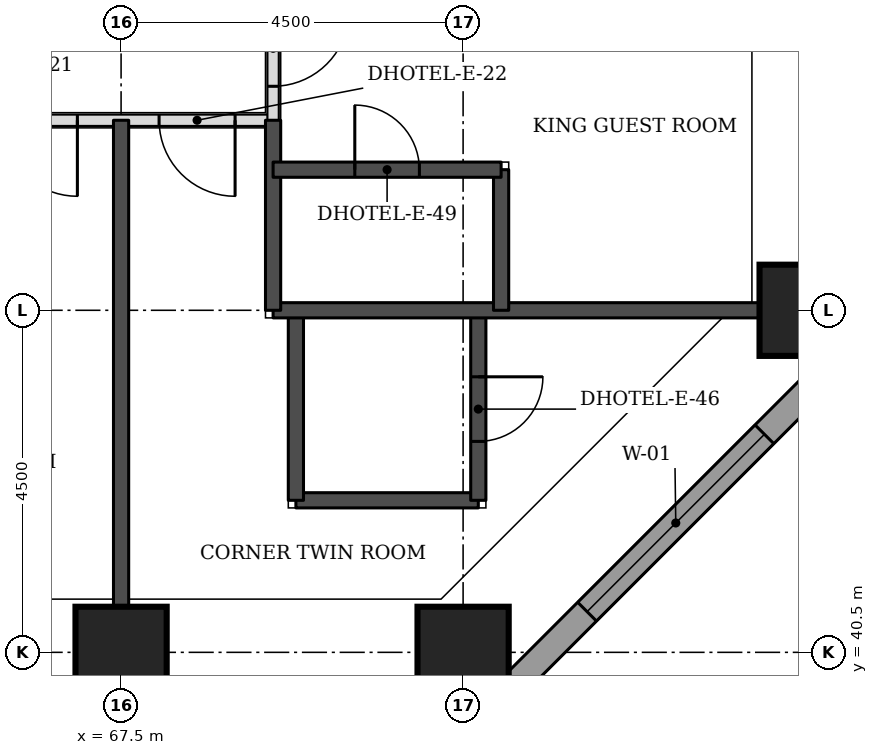
"""IFC4 building model, lengths in metres.
Left out: names, types, materials, properties, quantities, classifications, styles, units other than length and angle.
Written with IfcOpenShell. Run it as: python <this file> out.ifc"""

import sys

from ifc_helpers import new_model, si_unit, direction, frame, frame_2d, origin, origin_2d, place, context, subcontext, project, spatial, rectangle, extrude, element, fill, save


model = new_model("IFC4")
c1 = context("Model", 3, precision=1e-05, world=origin(), true_north=direction((0.0, 1.0)))
c2 = subcontext(c1, "Body", "Model", "MODEL_VIEW")
j1 = project(units=[si_unit("LENGTHUNIT", "METRE"), si_unit("PLANEANGLEUNIT", "RADIAN")], contexts=[c1])
p1 = place(None, origin())
s1 = spatial("IfcSite", under=j1, at=p1, CompositionType="ELEMENT")
p2 = place(p1, origin())
s2 = spatial("IfcBuilding", under=s1, at=p2, CompositionType="ELEMENT")
p3 = place(p2, frame((0.0, 0.0, 39.6)))
s3 = spatial("IfcBuildingStorey", under=s2, at=p3, CompositionType="ELEMENT", Elevation=39.6)
for number, where, z_axis, x_axis in (
    (1, (67.5, 40.5, 0.0), (0.0, 0.0, 1.0), (1.0, 0.0, 0.0)),
    (2, (72.0, 40.5, 0.0), (0.0, 0.0, 1.0), (1.0, 0.0, 0.0)),
    (3, (76.5, 45.0, 0.0), (0.0, 0.0, 1.0), (1.0, 0.0, 0.0)),
):
    element("IfcColumn", number, at=place(p3, frame(where, z_axis=z_axis, x_axis=x_axis)), inside=s3, PredefinedType="COLUMN", context=c2, shape_type="SweptSolid", body=[
        extrude(rectangle(XDim=1.2, YDim=1.2, at=origin_2d()), origin(), (0.0, 0.0, 1.0), 3.3),
    ])
p4 = place(p3, frame((72.27, 39.674, 0.0), z_axis=(0.0, 0.0, 1.0), x_axis=(0.707106781187, 0.707106781187, 0.0)))
e4 = element("IfcWall", 4, at=p4, inside=s3, PredefinedType="STANDARD", context=c2, shape_type="SweptSolid", body=[
    extrude(rectangle(XDim=7.151, YDim=0.35, at=frame_2d((3.576, 0.0))), origin(), (0.0, 0.0, 1.0), 3.055),
])
p5 = place(p4, frame((1.926, 0.0, 0.8)))
e5 = element("IfcOpeningElement", 5, at=p5, cuts=e4, PredefinedType="OPENING", context=c2, shape_type="SweptSolid", body=[
    extrude(rectangle(XDim=3.3, YDim=1.5, at=frame_2d((1.65, 0.75))), frame((0.0, 0.185, 0.0), z_axis=(0.0, -1.0, 0.0), x_axis=(1.0, 0.0, 0.0)), (0.0, 0.0, 1.0), 0.37),
])
p6 = place(p3, frame((52.85, 47.5, 0.0), z_axis=(0.0, 0.0, 1.0), x_axis=(1.0, 0.0, 0.0)))
e6 = element("IfcWall", 6, at=p6, inside=s3, PredefinedType="PARTITIONING", context=c2, shape_type="SweptSolid", body=[
    extrude(rectangle(XDim=16.65, YDim=0.15, at=frame_2d((8.325, 0.0))), origin(), (0.0, 0.0, 1.0), 3.08),
])
p7 = place(p6, frame((13.075, 0.0, 0.0)))
e7 = element("IfcOpeningElement", 7, at=p7, cuts=e6, PredefinedType="OPENING", context=c2, shape_type="SweptSolid", body=[
    extrude(rectangle(XDim=1.0, YDim=2.1, at=frame_2d((0.5, 1.05))), frame((0.0, 0.085, 0.0), z_axis=(0.0, -1.0, 0.0), x_axis=(1.0, 0.0, 0.0)), (0.0, 0.0, 1.0), 0.17),
])
p8 = place(p6, frame((6.475, 0.0, 0.0)))
e8 = element("IfcOpeningElement", 8, at=p8, cuts=e6, PredefinedType="OPENING", context=c2, shape_type="SweptSolid", body=[
    extrude(rectangle(XDim=1.0, YDim=2.1, at=frame_2d((0.5, 1.05))), frame((0.0, 0.085, 0.0), z_axis=(0.0, -1.0, 0.0), x_axis=(1.0, 0.0, 0.0)), (0.0, 0.0, 1.0), 0.17),
])
p9 = place(p6, frame((15.15, 0.0, 0.0)))
e9 = element("IfcOpeningElement", 9, at=p9, cuts=e6, PredefinedType="OPENING", context=c2, shape_type="SweptSolid", body=[
    extrude(rectangle(XDim=1.0, YDim=2.1, at=frame_2d((0.5, 1.05))), frame((0.0, 0.085, 0.0), z_axis=(0.0, -1.0, 0.0), x_axis=(1.0, 0.0, 0.0)), (0.0, 0.0, 1.0), 0.17),
])
p10 = place(p3, frame((69.5, 47.5, 0.0), z_axis=(0.0, 0.0, 1.0), x_axis=(0.0, 1.0, 0.0)))
e10 = element("IfcWall", 10, at=p10, inside=s3, PredefinedType="PARTITIONING", context=c2, shape_type="SweptSolid", body=[
    extrude(rectangle(XDim=26.5, YDim=0.15, at=frame_2d((13.25, 0.0))), origin(), (0.0, 0.0, 1.0), 3.08),
])
p11 = place(p10, frame((25.053, 0.0, 0.0)))
e11 = element("IfcOpeningElement", 11, at=p11, cuts=e10, PredefinedType="OPENING", context=c2, shape_type="SweptSolid", body=[
    extrude(rectangle(XDim=1.0, YDim=2.1, at=frame_2d((0.5, 1.05))), frame((0.0, 0.085, 0.0), z_axis=(0.0, -1.0, 0.0), x_axis=(1.0, 0.0, 0.0)), (0.0, 0.0, 1.0), 0.17),
])
p12 = place(p10, frame((13.775, 0.0, 0.0)))
e12 = element("IfcOpeningElement", 12, at=p12, cuts=e10, PredefinedType="OPENING", context=c2, shape_type="SweptSolid", body=[
    extrude(rectangle(XDim=1.0, YDim=2.1, at=frame_2d((0.5, 1.05))), frame((0.0, 0.085, 0.0), z_axis=(0.0, -1.0, 0.0), x_axis=(1.0, 0.0, 0.0)), (0.0, 0.0, 1.0), 0.17),
])
p13 = place(p10, frame((7.65, 0.0, 0.0)))
e13 = element("IfcOpeningElement", 13, at=p13, cuts=e10, PredefinedType="OPENING", context=c2, shape_type="SweptSolid", body=[
    extrude(rectangle(XDim=1.1, YDim=2.1, at=frame_2d((0.55, 1.05))), frame((0.0, 0.085, 0.0), z_axis=(0.0, -1.0, 0.0), x_axis=(1.0, 0.0, 0.0)), (0.0, 0.0, 1.0), 0.17),
])
p14 = place(p10, frame((0.447, 0.0, 0.0)))
e14 = element("IfcOpeningElement", 14, at=p14, cuts=e10, PredefinedType="OPENING", context=c2, shape_type="SweptSolid", body=[
    extrude(rectangle(XDim=1.0, YDim=2.1, at=frame_2d((0.5, 1.05))), frame((0.0, 0.085, 0.0), z_axis=(0.0, -1.0, 0.0), x_axis=(1.0, 0.0, 0.0)), (0.0, 0.0, 1.0), 0.17),
])
p15 = place(p3, frame((67.5, 41.1, 0.0), z_axis=(0.0, 0.0, 1.0), x_axis=(0.0, 1.0, 0.0)))
e15 = element("IfcWall", 15, at=p15, inside=s3, PredefinedType="SOLIDWALL", context=c2, shape_type="SweptSolid", body=[
    extrude(rectangle(XDim=6.4, YDim=0.2, at=frame_2d((3.2, 0.0))), origin(), (0.0, 0.0, 1.0), 3.08),
])
p16 = place(p3, frame((69.8, 42.5, 0.0), z_axis=(0.0, 0.0, 1.0), x_axis=(1.0, 0.0, 0.0)))
e16 = element("IfcWall", 16, at=p16, inside=s3, PredefinedType="SOLIDWALL", context=c2, shape_type="SweptSolid", body=[
    extrude(rectangle(XDim=2.4, YDim=0.2, at=frame_2d((1.2, 0.0))), origin(), (0.0, 0.0, 1.0), 3.08),
])
p17 = place(p3, frame((69.8, 42.5, 0.0), z_axis=(0.0, 0.0, 1.0), x_axis=(0.0, 1.0, 0.0)))
e17 = element("IfcWall", 17, at=p17, inside=s3, PredefinedType="SOLIDWALL", context=c2, shape_type="SweptSolid", body=[
    extrude(rectangle(XDim=2.5, YDim=0.2, at=frame_2d((1.25, 0.0))), origin(), (0.0, 0.0, 1.0), 3.08),
])
p18 = place(p3, frame((72.2, 42.5, 0.0), z_axis=(0.0, 0.0, 1.0), x_axis=(0.0, 1.0, 0.0)))
e18 = element("IfcWall", 18, at=p18, inside=s3, PredefinedType="SOLIDWALL", context=c2, shape_type="SweptSolid", body=[
    extrude(rectangle(XDim=2.5, YDim=0.2, at=frame_2d((1.25, 0.0))), origin(), (0.0, 0.0, 1.0), 3.08),
])
p19 = place(p18, frame((0.775, 0.0, 0.0)))
e19 = element("IfcOpeningElement", 19, at=p19, cuts=e18, PredefinedType="OPENING", context=c2, shape_type="SweptSolid", body=[
    extrude(rectangle(XDim=0.85, YDim=2.1, at=frame_2d((0.425, 1.05))), frame((0.0, 0.11, 0.0), z_axis=(0.0, -1.0, 0.0), x_axis=(1.0, 0.0, 0.0)), (0.0, 0.0, 1.0), 0.22),
])
p20 = place(p3, frame((69.5, 45.0, 0.0), z_axis=(0.0, 0.0, 1.0), x_axis=(1.0, 0.0, 0.0)))
e20 = element("IfcWall", 20, at=p20, inside=s3, PredefinedType="SOLIDWALL", context=c2, shape_type="SweptSolid", body=[
    extrude(rectangle(XDim=6.4, YDim=0.2, at=frame_2d((3.2, 0.0))), origin(), (0.0, 0.0, 1.0), 3.08),
])
p21 = place(p3, frame((69.5, 45.0, 0.0), z_axis=(0.0, 0.0, 1.0), x_axis=(0.0, 1.0, 0.0)))
e21 = element("IfcWall", 21, at=p21, inside=s3, PredefinedType="SOLIDWALL", context=c2, shape_type="SweptSolid", body=[
    extrude(rectangle(XDim=2.5, YDim=0.2, at=frame_2d((1.25, 0.0))), origin(), (0.0, 0.0, 1.0), 3.08),
])
p22 = place(p3, frame((72.5, 45.0, 0.0), z_axis=(0.0, 0.0, 1.0), x_axis=(0.0, 1.0, 0.0)))
e22 = element("IfcWall", 22, at=p22, inside=s3, PredefinedType="SOLIDWALL", context=c2, shape_type="SweptSolid", body=[
    extrude(rectangle(XDim=1.85, YDim=0.2, at=frame_2d((0.925, 0.0))), origin(), (0.0, 0.0, 1.0), 3.08),
])
p23 = place(p3, frame((69.5, 46.85, 0.0), z_axis=(0.0, 0.0, 1.0), x_axis=(1.0, 0.0, 0.0)))
e23 = element("IfcWall", 23, at=p23, inside=s3, PredefinedType="SOLIDWALL", context=c2, shape_type="SweptSolid", body=[
    extrude(rectangle(XDim=3.0, YDim=0.2, at=frame_2d((1.5, 0.0))), origin(), (0.0, 0.0, 1.0), 3.08),
])
p24 = place(p23, frame((1.075, 0.0, 0.0)))
e24 = element("IfcOpeningElement", 24, at=p24, cuts=e23, PredefinedType="OPENING", context=c2, shape_type="SweptSolid", body=[
    extrude(rectangle(XDim=0.85, YDim=2.1, at=frame_2d((0.425, 1.05))), frame((0.0, 0.11, 0.0), z_axis=(0.0, -1.0, 0.0), x_axis=(1.0, 0.0, 0.0)), (0.0, 0.0, 1.0), 0.22),
])
p25 = place(p5, origin())
e25 = element("IfcWindow", 25, at=p25, inside=s3, PartitioningType="SINGLE_PANEL", PredefinedType="WINDOW", context=c2, shape_type="SweptSolid", body=[
    extrude(rectangle(XDim=3.3, YDim=1.5, at=frame_2d((1.65, 0.75))), frame((0.0, 0.085, 0.0), z_axis=(0.0, -1.0, 0.0), x_axis=(1.0, 0.0, 0.0)), (0.0, 0.0, 1.0), 0.06),
])
fill(e5, e25)
p26 = place(p14, frame((1.0, 0.0, 0.0), z_axis=(0.0, 0.0, 1.0), x_axis=(-1.0, 0.0, 0.0)))
e26 = element("IfcDoor", 26, at=p26, inside=s3, OperationType="SINGLE_SWING_LEFT", PredefinedType="DOOR", context=c2, shape_type="SweptSolid", body=[
    extrude(rectangle(XDim=1.0, YDim=2.1, at=frame_2d((0.5, 1.05))), frame((0.0, 0.025, 0.0), z_axis=(0.0, -1.0, 0.0), x_axis=(1.0, 0.0, 0.0)), (0.0, 0.0, 1.0), 0.05),
])
fill(e14, e26)
p27 = place(p24, origin())
e27 = element("IfcDoor", 27, at=p27, inside=s3, OperationType="SINGLE_SWING_LEFT", PredefinedType="DOOR", context=c2, shape_type="SweptSolid", body=[
    extrude(rectangle(XDim=0.85, YDim=2.1, at=frame_2d((0.425, 1.05))), frame((0.0, 0.025, 0.0), z_axis=(0.0, -1.0, 0.0), x_axis=(1.0, 0.0, 0.0)), (0.0, 0.0, 1.0), 0.05),
])
fill(e24, e27)
p28 = place(p7, frame((1.0, 0.0, 0.0), z_axis=(0.0, 0.0, 1.0), x_axis=(-1.0, 0.0, 0.0)))
e28 = element("IfcDoor", 28, at=p28, inside=s3, OperationType="SINGLE_SWING_LEFT", PredefinedType="DOOR", context=c2, shape_type="SweptSolid", body=[
    extrude(rectangle(XDim=1.0, YDim=2.1, at=frame_2d((0.5, 1.05))), frame((0.0, 0.025, 0.0), z_axis=(0.0, -1.0, 0.0), x_axis=(1.0, 0.0, 0.0)), (0.0, 0.0, 1.0), 0.05),
])
fill(e7, e28)
p29 = place(p9, frame((1.0, 0.0, 0.0), z_axis=(0.0, 0.0, 1.0), x_axis=(-1.0, 0.0, 0.0)))
e29 = element("IfcDoor", 29, at=p29, inside=s3, OperationType="SINGLE_SWING_LEFT", PredefinedType="DOOR", context=c2, shape_type="SweptSolid", body=[
    extrude(rectangle(XDim=1.0, YDim=2.1, at=frame_2d((0.5, 1.05))), frame((0.0, 0.025, 0.0), z_axis=(0.0, -1.0, 0.0), x_axis=(1.0, 0.0, 0.0)), (0.0, 0.0, 1.0), 0.05),
])
fill(e9, e29)
p30 = place(p19, frame((0.85, 0.0, 0.0), z_axis=(0.0, 0.0, 1.0), x_axis=(-1.0, 0.0, 0.0)))
e30 = element("IfcDoor", 30, at=p30, inside=s3, OperationType="SINGLE_SWING_LEFT", PredefinedType="DOOR", context=c2, shape_type="SweptSolid", body=[
    extrude(rectangle(XDim=0.85, YDim=2.1, at=frame_2d((0.425, 1.05))), frame((0.0, 0.025, 0.0), z_axis=(0.0, -1.0, 0.0), x_axis=(1.0, 0.0, 0.0)), (0.0, 0.0, 1.0), 0.05),
])
fill(e19, e30)
save(model, sys.argv[1])
